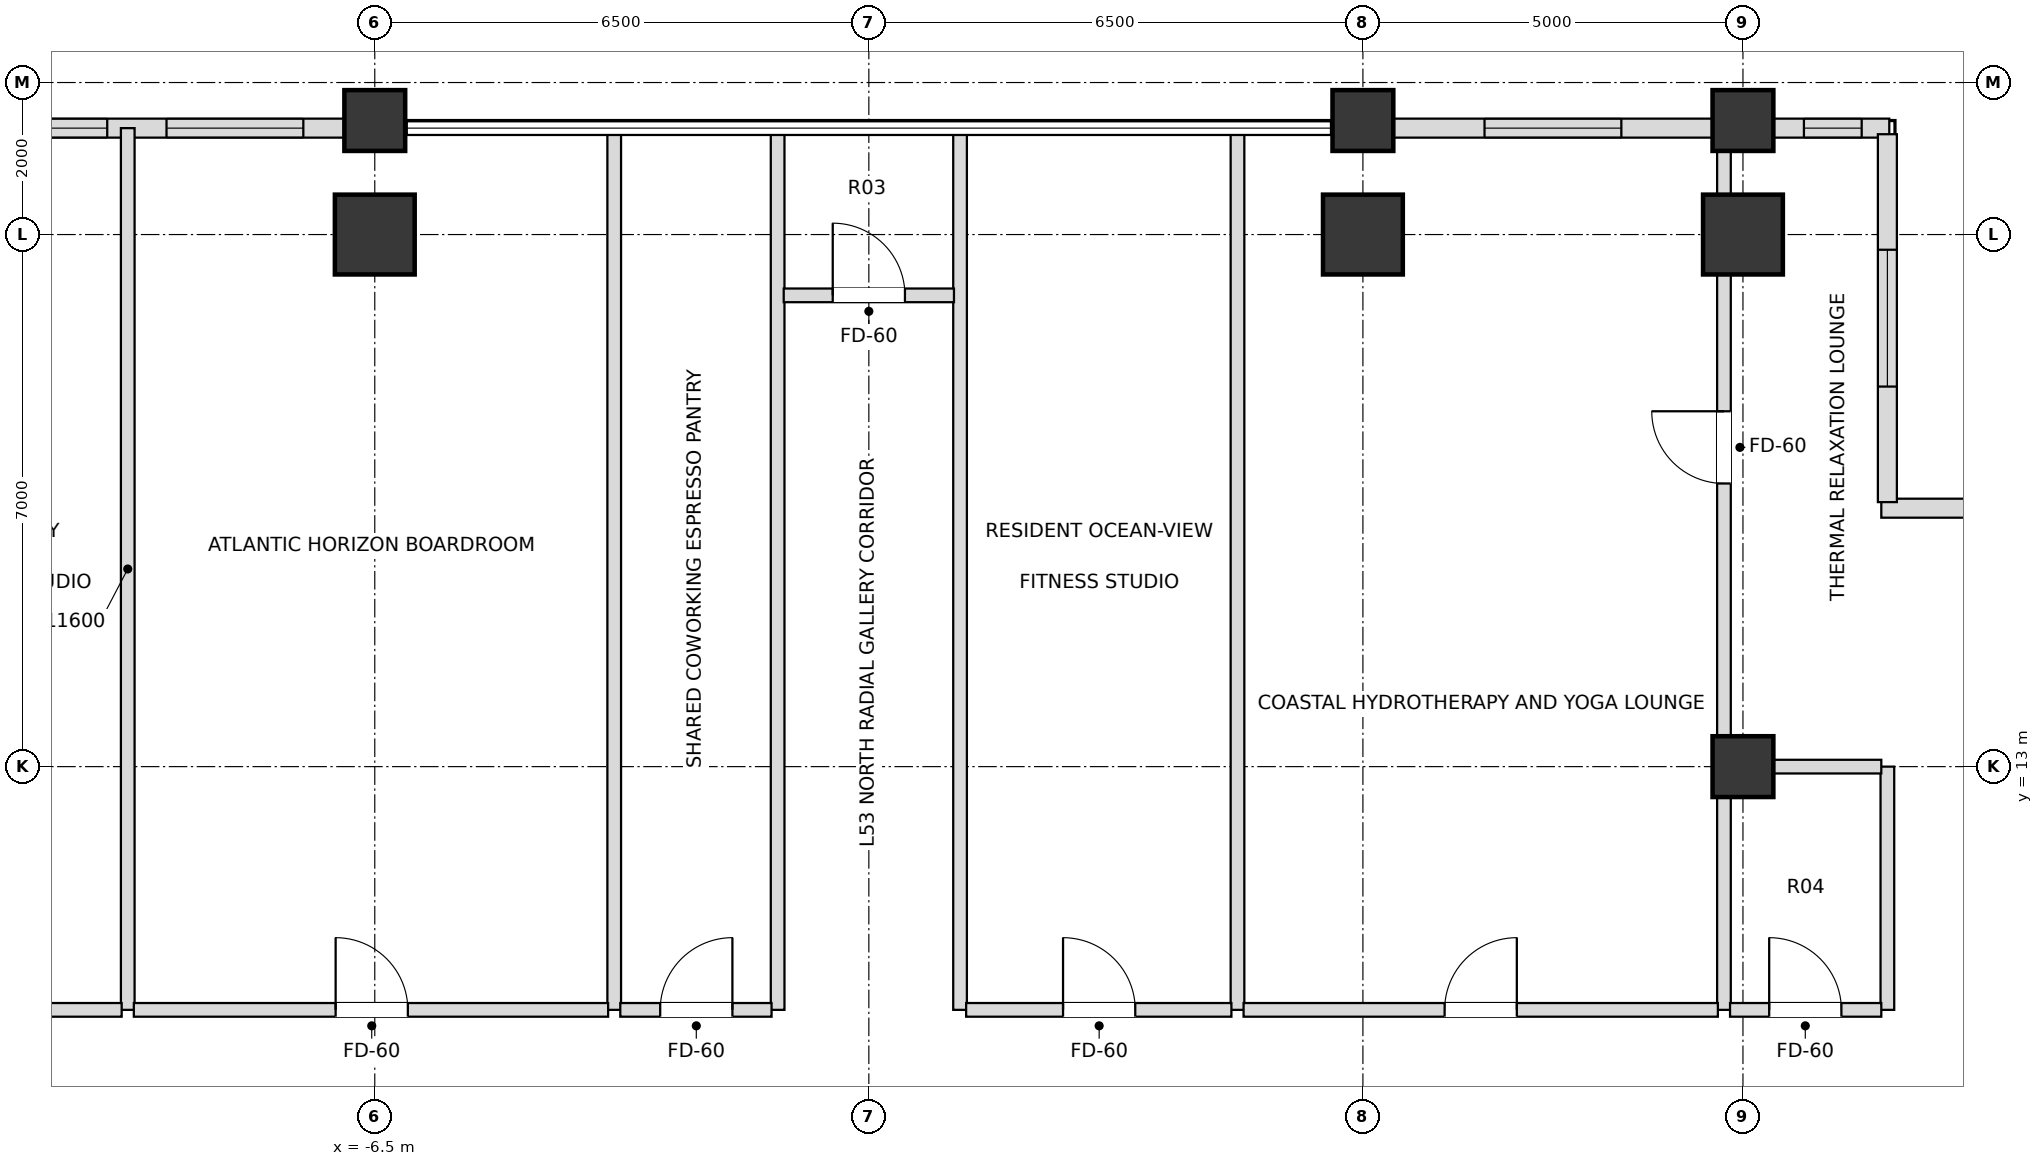
"""IFC4 building model, lengths in metres.
Left out: names, types, materials, properties, quantities, classifications, styles, units other than length and angle.
Written with IfcOpenShell. Run it as: python <this file> out.ifc"""

import sys

from ifc_helpers import new_model, si_unit, direction, frame, frame_2d, origin, origin_2d, place, context, subcontext, project, spatial, rectangle, extrude, element, fill, save


model = new_model("IFC4")
c1 = context("Model", 3, precision=1e-05, world=origin(), true_north=direction((0.0, 1.0)))
c2 = subcontext(c1, "Body", "Model", "MODEL_VIEW")
j1 = project(units=[si_unit("LENGTHUNIT", "METRE"), si_unit("PLANEANGLEUNIT", "RADIAN")], contexts=[c1])
p1 = place(None, origin())
s1 = spatial("IfcSite", under=j1, at=p1, CompositionType="ELEMENT")
p2 = place(p1, origin())
s2 = spatial("IfcBuilding", under=s1, at=p2, CompositionType="ELEMENT")
p3 = place(p2, frame((0.0, 0.0, 205.2)))
s3 = spatial("IfcBuildingStorey", under=s2, at=p3, CompositionType="ELEMENT", Elevation=205.2)
for number, where, z_axis, x_axis in (
    (1, (11.5, 20.0, 0.0), (0.0, 0.0, 1.0), (1.0, 0.0, 0.0)),
    (2, (6.5, 20.0, 0.0), (0.0, 0.0, 1.0), (1.0, 0.0, 0.0)),
    (3, (-6.5, 20.0, 0.0), (0.0, 0.0, 1.0), (1.0, 0.0, 0.0)),
):
    element("IfcColumn", number, at=place(p3, frame(where, z_axis=z_axis, x_axis=x_axis)), inside=s3, PredefinedType="USERDEFINED", context=c2, shape_type="SweptSolid", body=[
        extrude(rectangle(XDim=1.05, YDim=1.05, at=origin_2d()), origin(), (0.0, 0.0, 1.0), 3.6),
    ])
for number, where, z_axis, x_axis in (
    (4, (11.5, 13.0, 0.0), (0.0, 0.0, 1.0), (1.0, 0.0, 0.0)),
    (5, (-6.5, 21.5, 0.0), (0.0, 0.0, 1.0), (1.0, 0.0, 0.0)),
    (6, (6.5, 21.5, 0.0), (0.0, 0.0, 1.0), (1.0, 0.0, 0.0)),
    (7, (11.5, 21.5, 0.0), (0.0, 0.0, 1.0), (1.0, 0.0, 0.0)),
):
    element("IfcColumn", number, at=place(p3, frame(where, z_axis=z_axis, x_axis=x_axis)), inside=s3, PredefinedType="COLUMN", context=c2, shape_type="SweptSolid", body=[
        extrude(rectangle(XDim=0.8, YDim=0.8, at=origin_2d()), origin(), (0.0, 0.0, 1.0), 3.6),
    ])
p4 = place(p3, frame((13.425, 21.4, 0.0), z_axis=(0.0, 0.0, 1.0), x_axis=(-1.0, 0.0, 0.0)))
e8 = element("IfcWall", 8, at=p4, inside=s3, PredefinedType="SOLIDWALL", context=c2, shape_type="SweptSolid", body=[
    extrude(rectangle(XDim=1.53, YDim=0.25, at=frame_2d((0.765, 0.0))), origin(), (0.0, 0.0, 1.0), 2.748),
])
p5 = place(p4, frame((0.363, 0.0, 0.72)))
e9 = element("IfcOpeningElement", 9, at=p5, cuts=e8, PredefinedType="OPENING", context=c2, shape_type="SweptSolid", body=[
    extrude(rectangle(XDim=0.76, YDim=1.68, at=frame_2d((0.38, 0.84))), frame((0.0, 0.135, 0.0), z_axis=(0.0, -1.0, 0.0), x_axis=(1.0, 0.0, 0.0)), (0.0, 0.0, 1.0), 0.27),
])
p6 = place(p3, frame((11.105, 21.4, 0.0), z_axis=(0.0, 0.0, 1.0), x_axis=(-1.0, 0.0, 0.0)))
e10 = element("IfcWall", 10, at=p6, inside=s3, PredefinedType="SOLIDWALL", context=c2, shape_type="SweptSolid", body=[
    extrude(rectangle(XDim=4.21, YDim=0.25, at=frame_2d((2.105, 0.0))), origin(), (0.0, 0.0, 1.0), 2.748),
])
p7 = place(p6, frame((1.205, 0.0, 0.72)))
e11 = element("IfcOpeningElement", 11, at=p7, cuts=e10, PredefinedType="OPENING", context=c2, shape_type="SweptSolid", body=[
    extrude(rectangle(XDim=1.8, YDim=1.68, at=frame_2d((0.9, 0.84))), frame((0.0, 0.135, 0.0), z_axis=(0.0, -1.0, 0.0), x_axis=(1.0, 0.0, 0.0)), (0.0, 0.0, 1.0), 0.27),
])
p8 = place(p3, frame((-6.895, 21.4, 0.0), z_axis=(0.0, 0.0, 1.0), x_axis=(-1.0, 0.0, 0.0)))
e12 = element("IfcWall", 12, at=p8, inside=s3, PredefinedType="SOLIDWALL", context=c2, shape_type="SweptSolid", body=[
    extrude(rectangle(XDim=4.21, YDim=0.25, at=frame_2d((2.105, 0.0))), origin(), (0.0, 0.0, 1.0), 2.748),
])
p9 = place(p8, frame((0.545, 0.0, 0.72)))
e13 = element("IfcOpeningElement", 13, at=p9, cuts=e12, PredefinedType="OPENING", context=c2, shape_type="SweptSolid", body=[
    extrude(rectangle(XDim=1.8, YDim=1.68, at=frame_2d((0.9, 0.84))), frame((0.0, 0.135, 0.0), z_axis=(0.0, -1.0, 0.0), x_axis=(1.0, 0.0, 0.0)), (0.0, 0.0, 1.0), 0.27),
])
p10 = place(p8, frame((3.125, 0.0, 0.72)))
e14 = element("IfcOpeningElement", 14, at=p10, cuts=e12, PredefinedType="OPENING", context=c2, shape_type="SweptSolid", body=[
    extrude(rectangle(XDim=0.76, YDim=1.68, at=frame_2d((0.38, 0.84))), frame((0.0, 0.135, 0.0), z_axis=(0.0, -1.0, 0.0), x_axis=(1.0, 0.0, 0.0)), (0.0, 0.0, 1.0), 0.27),
])
p11 = place(p3, frame((18.48, 16.4, 0.0), z_axis=(0.0, 0.0, 1.0), x_axis=(-1.0, 0.0, 0.0)))
e15 = element("IfcWall", 15, at=p11, inside=s3, PredefinedType="SOLIDWALL", context=c2, shape_type="SweptSolid", body=[
    extrude(rectangle(XDim=5.16, YDim=0.25, at=frame_2d((2.58, 0.0))), origin(), (0.0, 0.0, 1.0), 2.748),
])
p12 = place(p11, frame((1.68, 0.0, 0.72)))
e16 = element("IfcOpeningElement", 16, at=p12, cuts=e15, PredefinedType="OPENING", context=c2, shape_type="SweptSolid", body=[
    extrude(rectangle(XDim=1.8, YDim=1.68, at=frame_2d((0.9, 0.84))), frame((0.0, 0.135, 0.0), z_axis=(0.0, -1.0, 0.0), x_axis=(1.0, 0.0, 0.0)), (0.0, 0.0, 1.0), 0.27),
])
p13 = place(p3, frame((13.4, 16.48, 0.0), z_axis=(0.0, 0.0, 1.0), x_axis=(0.0, 1.0, 0.0)))
e17 = element("IfcWall", 17, at=p13, inside=s3, PredefinedType="SOLIDWALL", context=c2, shape_type="SweptSolid", body=[
    extrude(rectangle(XDim=4.84, YDim=0.25, at=frame_2d((2.42, 0.0))), origin(), (0.0, 0.0, 1.0), 2.748),
])
p14 = place(p13, frame((1.52, 0.0, 0.72)))
e18 = element("IfcOpeningElement", 18, at=p14, cuts=e17, PredefinedType="OPENING", context=c2, shape_type="SweptSolid", body=[
    extrude(rectangle(XDim=1.8, YDim=1.68, at=frame_2d((0.9, 0.84))), frame((0.0, 0.135, 0.0), z_axis=(0.0, -1.0, 0.0), x_axis=(1.0, 0.0, 0.0)), (0.0, 0.0, 1.0), 0.27),
])
for number, where, z_axis, x_axis in (
    (19, (-9.75, 9.8, 0.0), (0.0, 0.0, 1.0), (0.0, 1.0, 0.0)),
    (20, (-3.35, 9.8, 0.0), (0.0, 0.0, 1.0), (0.0, 1.0, 0.0)),
    (21, (-1.2, 9.8, 0.0), (0.0, 0.0, 1.0), (0.0, 1.0, 0.0)),
    (22, (1.2, 9.8, 0.0), (0.0, 0.0, 1.0), (0.0, 1.0, 0.0)),
    (23, (4.85, 9.8, 0.0), (0.0, 0.0, 1.0), (0.0, 1.0, 0.0)),
):
    element("IfcWall", number, at=place(p3, frame(where, z_axis=z_axis, x_axis=x_axis)), inside=s3, PredefinedType="PARTITIONING", context=c2, shape_type="SweptSolid", body=[
        extrude(rectangle(XDim=11.6, YDim=0.18, at=frame_2d((5.8, 0.0))), origin(), (0.0, 0.0, 1.0), 2.826),
    ])
p15 = place(p3, frame((11.25, 9.8, 0.0), z_axis=(0.0, 0.0, 1.0), x_axis=(0.0, 1.0, 0.0)))
e24 = element("IfcWall", 24, at=p15, inside=s3, PredefinedType="PARTITIONING", context=c2, shape_type="SweptSolid", body=[
    extrude(rectangle(XDim=11.6, YDim=0.18, at=frame_2d((5.8, 0.0))), origin(), (0.0, 0.0, 1.0), 2.826),
])
p16 = place(p15, frame((6.925, 0.0, 0.0)))
e25 = element("IfcOpeningElement", 25, at=p16, cuts=e24, PredefinedType="OPENING", context=c2, shape_type="SweptSolid", body=[
    extrude(rectangle(XDim=0.95, YDim=2.15, at=frame_2d((0.475, 1.075))), frame((0.0, 0.1, 0.0), z_axis=(0.0, -1.0, 0.0), x_axis=(1.0, 0.0, 0.0)), (0.0, 0.0, 1.0), 0.2),
])
p17 = place(p3, frame((13.4, 9.8, 0.0), z_axis=(0.0, 0.0, 1.0), x_axis=(0.0, 1.0, 0.0)))
e26 = element("IfcWall", 26, at=p17, inside=s3, PredefinedType="PARTITIONING", context=c2, shape_type="SweptSolid", body=[
    extrude(rectangle(XDim=3.2, YDim=0.18, at=frame_2d((1.6, 0.0))), origin(), (0.0, 0.0, 1.0), 3.38),
])
p18 = place(p3, frame((-13.4, 9.8, 0.0), z_axis=(0.0, 0.0, 1.0), x_axis=(1.0, 0.0, 0.0)))
e27 = element("IfcWall", 27, at=p18, inside=s3, PredefinedType="PARTITIONING", context=c2, shape_type="SweptSolid", body=[
    extrude(rectangle(XDim=3.57, YDim=0.18, at=frame_2d((1.785, 0.0))), origin(), (0.0, 0.0, 1.0), 3.38),
])
p19 = place(p18, frame((1.355, 0.0, 0.0)))
e28 = element("IfcOpeningElement", 28, at=p19, cuts=e27, PredefinedType="OPENING", context=c2, shape_type="SweptSolid", body=[
    extrude(rectangle(XDim=0.95, YDim=2.15, at=frame_2d((0.475, 1.075))), frame((0.0, 0.1, 0.0), z_axis=(0.0, -1.0, 0.0), x_axis=(1.0, 0.0, 0.0)), (0.0, 0.0, 1.0), 0.2),
])
p20 = place(p3, frame((-9.67, 9.8, 0.0), z_axis=(0.0, 0.0, 1.0), x_axis=(1.0, 0.0, 0.0)))
e29 = element("IfcWall", 29, at=p20, inside=s3, PredefinedType="PARTITIONING", context=c2, shape_type="SweptSolid", body=[
    extrude(rectangle(XDim=6.24, YDim=0.18, at=frame_2d((3.12, 0.0))), origin(), (0.0, 0.0, 1.0), 2.826),
])
p21 = place(p20, frame((2.655, 0.0, 0.0)))
e30 = element("IfcOpeningElement", 30, at=p21, cuts=e29, PredefinedType="OPENING", context=c2, shape_type="SweptSolid", body=[
    extrude(rectangle(XDim=0.95, YDim=2.15, at=frame_2d((0.475, 1.075))), frame((0.0, 0.1, 0.0), z_axis=(0.0, -1.0, 0.0), x_axis=(1.0, 0.0, 0.0)), (0.0, 0.0, 1.0), 0.2),
])
p22 = place(p3, frame((-3.27, 9.8, 0.0), z_axis=(0.0, 0.0, 1.0), x_axis=(1.0, 0.0, 0.0)))
e31 = element("IfcWall", 31, at=p22, inside=s3, PredefinedType="PARTITIONING", context=c2, shape_type="SweptSolid", body=[
    extrude(rectangle(XDim=1.99, YDim=0.18, at=frame_2d((0.995, 0.0))), origin(), (0.0, 0.0, 1.0), 3.38),
])
p23 = place(p22, frame((0.525, 0.0, 0.0)))
e32 = element("IfcOpeningElement", 32, at=p23, cuts=e31, PredefinedType="OPENING", context=c2, shape_type="SweptSolid", body=[
    extrude(rectangle(XDim=0.95, YDim=2.15, at=frame_2d((0.475, 1.075))), frame((0.0, 0.1, 0.0), z_axis=(0.0, -1.0, 0.0), x_axis=(1.0, 0.0, 0.0)), (0.0, 0.0, 1.0), 0.2),
])
p24 = place(p3, frame((1.28, 9.8, 0.0), z_axis=(0.0, 0.0, 1.0), x_axis=(1.0, 0.0, 0.0)))
e33 = element("IfcWall", 33, at=p24, inside=s3, PredefinedType="PARTITIONING", context=c2, shape_type="SweptSolid", body=[
    extrude(rectangle(XDim=3.49, YDim=0.18, at=frame_2d((1.745, 0.0))), origin(), (0.0, 0.0, 1.0), 3.38),
])
p25 = place(p24, frame((1.275, 0.0, 0.0)))
e34 = element("IfcOpeningElement", 34, at=p25, cuts=e33, PredefinedType="OPENING", context=c2, shape_type="SweptSolid", body=[
    extrude(rectangle(XDim=0.95, YDim=2.15, at=frame_2d((0.475, 1.075))), frame((0.0, 0.1, 0.0), z_axis=(0.0, -1.0, 0.0), x_axis=(1.0, 0.0, 0.0)), (0.0, 0.0, 1.0), 0.2),
])
p26 = place(p3, frame((4.93, 9.8, 0.0), z_axis=(0.0, 0.0, 1.0), x_axis=(1.0, 0.0, 0.0)))
e35 = element("IfcWall", 35, at=p26, inside=s3, PredefinedType="PARTITIONING", context=c2, shape_type="SweptSolid", body=[
    extrude(rectangle(XDim=6.24, YDim=0.18, at=frame_2d((3.12, 0.0))), origin(), (0.0, 0.0, 1.0), 2.826),
])
p27 = place(p26, frame((2.645, 0.0, 0.0)))
e36 = element("IfcOpeningElement", 36, at=p27, cuts=e35, PredefinedType="OPENING", context=c2, shape_type="SweptSolid", body=[
    extrude(rectangle(XDim=0.95, YDim=2.15, at=frame_2d((0.475, 1.075))), frame((0.0, 0.1, 0.0), z_axis=(0.0, -1.0, 0.0), x_axis=(1.0, 0.0, 0.0)), (0.0, 0.0, 1.0), 0.2),
])
p28 = place(p3, frame((11.33, 9.8, 0.0), z_axis=(0.0, 0.0, 1.0), x_axis=(1.0, 0.0, 0.0)))
e37 = element("IfcWall", 37, at=p28, inside=s3, PredefinedType="PARTITIONING", context=c2, shape_type="SweptSolid", body=[
    extrude(rectangle(XDim=1.99, YDim=0.18, at=frame_2d((0.995, 0.0))), origin(), (0.0, 0.0, 1.0), 3.38),
])
p29 = place(p28, frame((0.515, 0.0, 0.0)))
e38 = element("IfcOpeningElement", 38, at=p29, cuts=e37, PredefinedType="OPENING", context=c2, shape_type="SweptSolid", body=[
    extrude(rectangle(XDim=0.95, YDim=2.15, at=frame_2d((0.475, 1.075))), frame((0.0, 0.1, 0.0), z_axis=(0.0, -1.0, 0.0), x_axis=(1.0, 0.0, 0.0)), (0.0, 0.0, 1.0), 0.2),
])
p30 = place(p3, frame((11.33, 13.0, 0.0), z_axis=(0.0, 0.0, 1.0), x_axis=(1.0, 0.0, 0.0)))
e39 = element("IfcWall", 39, at=p30, inside=s3, PredefinedType="PARTITIONING", context=c2, shape_type="SweptSolid", body=[
    extrude(rectangle(XDim=1.99, YDim=0.18, at=frame_2d((0.995, 0.0))), origin(), (0.0, 0.0, 1.0), 2.748),
])
p31 = place(p3, frame((-1.12, 19.2, 0.0), z_axis=(0.0, 0.0, 1.0), x_axis=(1.0, 0.0, 0.0)))
e40 = element("IfcWall", 40, at=p31, inside=s3, PredefinedType="PARTITIONING", context=c2, shape_type="SweptSolid", body=[
    extrude(rectangle(XDim=2.24, YDim=0.18, at=frame_2d((1.12, 0.0))), origin(), (0.0, 0.0, 1.0), 3.38),
])
p32 = place(p31, frame((0.645, 0.0, 0.0)))
e41 = element("IfcOpeningElement", 41, at=p32, cuts=e40, PredefinedType="OPENING", context=c2, shape_type="SweptSolid", body=[
    extrude(rectangle(XDim=0.95, YDim=2.15, at=frame_2d((0.475, 1.075))), frame((0.0, 0.1, 0.0), z_axis=(0.0, -1.0, 0.0), x_axis=(1.0, 0.0, 0.0)), (0.0, 0.0, 1.0), 0.2),
])
p33 = place(p5, origin())
e42 = element("IfcWindow", 42, at=p33, inside=s3, PartitioningType="SINGLE_PANEL", PredefinedType="WINDOW", context=c2, shape_type="SweptSolid", body=[
    extrude(rectangle(XDim=0.76, YDim=1.68, at=frame_2d((0.38, 0.84))), frame((0.0, 0.03, 0.0), z_axis=(0.0, -1.0, 0.0), x_axis=(1.0, 0.0, 0.0)), (0.0, 0.0, 1.0), 0.06),
])
fill(e9, e42)
p34 = place(p7, origin())
e43 = element("IfcWindow", 43, at=p34, inside=s3, PartitioningType="SINGLE_PANEL", PredefinedType="WINDOW", context=c2, shape_type="SweptSolid", body=[
    extrude(rectangle(XDim=1.8, YDim=1.68, at=frame_2d((0.9, 0.84))), frame((0.0, 0.03, 0.0), z_axis=(0.0, -1.0, 0.0), x_axis=(1.0, 0.0, 0.0)), (0.0, 0.0, 1.0), 0.06),
])
fill(e11, e43)
p35 = place(p9, origin())
e44 = element("IfcWindow", 44, at=p35, inside=s3, PartitioningType="SINGLE_PANEL", PredefinedType="WINDOW", context=c2, shape_type="SweptSolid", body=[
    extrude(rectangle(XDim=1.8, YDim=1.68, at=frame_2d((0.9, 0.84))), frame((0.0, 0.03, 0.0), z_axis=(0.0, -1.0, 0.0), x_axis=(1.0, 0.0, 0.0)), (0.0, 0.0, 1.0), 0.06),
])
fill(e13, e44)
p36 = place(p10, origin())
e45 = element("IfcWindow", 45, at=p36, inside=s3, PartitioningType="SINGLE_PANEL", PredefinedType="WINDOW", context=c2, shape_type="SweptSolid", body=[
    extrude(rectangle(XDim=0.76, YDim=1.68, at=frame_2d((0.38, 0.84))), frame((0.0, 0.03, 0.0), z_axis=(0.0, -1.0, 0.0), x_axis=(1.0, 0.0, 0.0)), (0.0, 0.0, 1.0), 0.06),
])
fill(e14, e45)
p37 = place(p14, origin())
e46 = element("IfcWindow", 46, at=p37, inside=s3, PartitioningType="SINGLE_PANEL", PredefinedType="WINDOW", context=c2, shape_type="SweptSolid", body=[
    extrude(rectangle(XDim=1.8, YDim=1.68, at=frame_2d((0.9, 0.84))), frame((0.0, 0.03, 0.0), z_axis=(0.0, -1.0, 0.0), x_axis=(1.0, 0.0, 0.0)), (0.0, 0.0, 1.0), 0.06),
])
fill(e18, e46)
p38 = place(p32, origin())
e47 = element("IfcDoor", 47, at=p38, inside=s3, OperationType="SINGLE_SWING_LEFT", PredefinedType="DOOR", context=c2, shape_type="SweptSolid", body=[
    extrude(rectangle(XDim=0.95, YDim=2.15, at=frame_2d((0.475, 1.075))), frame((0.0, 0.025, 0.0), z_axis=(0.0, -1.0, 0.0), x_axis=(1.0, 0.0, 0.0)), (0.0, 0.0, 1.0), 0.05),
])
fill(e41, e47)
p39 = place(p21, origin())
e48 = element("IfcDoor", 48, at=p39, inside=s3, OperationType="SINGLE_SWING_LEFT", PredefinedType="DOOR", context=c2, shape_type="SweptSolid", body=[
    extrude(rectangle(XDim=0.95, YDim=2.15, at=frame_2d((0.475, 1.075))), frame((0.0, 0.025, 0.0), z_axis=(0.0, -1.0, 0.0), x_axis=(1.0, 0.0, 0.0)), (0.0, 0.0, 1.0), 0.05),
])
fill(e30, e48)
p40 = place(p23, origin())
e49 = element("IfcDoor", 49, at=p40, inside=s3, OperationType="SINGLE_SWING_RIGHT", PredefinedType="DOOR", context=c2, shape_type="SweptSolid", body=[
    extrude(rectangle(XDim=0.95, YDim=2.15, at=frame_2d((0.475, 1.075))), frame((0.0, 0.025, 0.0), z_axis=(0.0, -1.0, 0.0), x_axis=(1.0, 0.0, 0.0)), (0.0, 0.0, 1.0), 0.05),
])
fill(e32, e49)
p41 = place(p29, origin())
e50 = element("IfcDoor", 50, at=p41, inside=s3, OperationType="SINGLE_SWING_LEFT", PredefinedType="DOOR", context=c2, shape_type="SweptSolid", body=[
    extrude(rectangle(XDim=0.95, YDim=2.15, at=frame_2d((0.475, 1.075))), frame((0.0, 0.025, 0.0), z_axis=(0.0, -1.0, 0.0), x_axis=(1.0, 0.0, 0.0)), (0.0, 0.0, 1.0), 0.05),
])
fill(e38, e50)
p42 = place(p16, origin())
e51 = element("IfcDoor", 51, at=p42, inside=s3, OperationType="SINGLE_SWING_RIGHT", PredefinedType="DOOR", context=c2, shape_type="SweptSolid", body=[
    extrude(rectangle(XDim=0.95, YDim=2.15, at=frame_2d((0.475, 1.075))), frame((0.0, 0.025, 0.0), z_axis=(0.0, -1.0, 0.0), x_axis=(1.0, 0.0, 0.0)), (0.0, 0.0, 1.0), 0.05),
])
fill(e25, e51)
p43 = place(p25, origin())
e52 = element("IfcDoor", 52, at=p43, inside=s3, OperationType="SINGLE_SWING_LEFT", PredefinedType="DOOR", context=c2, shape_type="SweptSolid", body=[
    extrude(rectangle(XDim=0.95, YDim=2.15, at=frame_2d((0.475, 1.075))), frame((0.0, 0.025, 0.0), z_axis=(0.0, -1.0, 0.0), x_axis=(1.0, 0.0, 0.0)), (0.0, 0.0, 1.0), 0.05),
])
fill(e34, e52)
p44 = place(p27, origin())
e53 = element("IfcDoor", 53, at=p44, inside=s3, OperationType="SINGLE_SWING_RIGHT", PredefinedType="DOOR", context=c2, shape_type="SweptSolid", body=[
    extrude(rectangle(XDim=0.95, YDim=2.15, at=frame_2d((0.475, 1.075))), frame((0.0, 0.025, 0.0), z_axis=(0.0, -1.0, 0.0), x_axis=(1.0, 0.0, 0.0)), (0.0, 0.0, 1.0), 0.05),
])
fill(e36, e53)
save(model, sys.argv[1])
